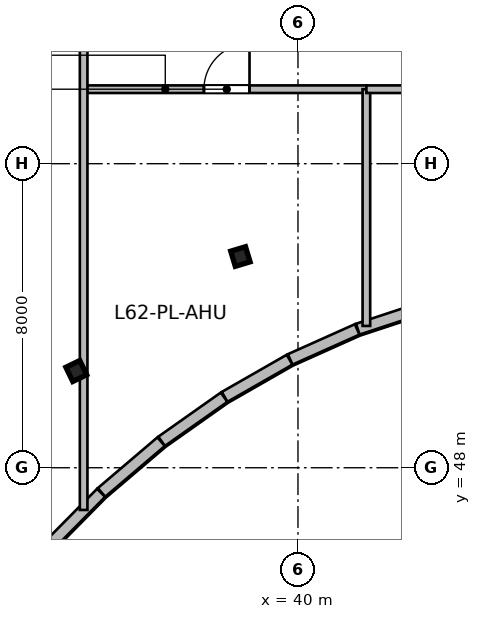
"""IFC4 building model, lengths in metres.
Left out: names, types, materials, properties, quantities, classifications, styles, units other than length and angle.
Written with IfcOpenShell. Run it as: python <this file> out.ifc"""

import sys

from ifc_helpers import new_model, si_unit, direction, frame, frame_2d, origin, origin_2d, place, context, subcontext, project, spatial, rectangle, i_section, extrude, source, transform, mapped, element, fill, save


model = new_model("IFC4")
c1 = context("Model", 3, precision=1e-05, world=origin(), true_north=direction((0.0, 1.0)))
c2 = subcontext(c1, "Body", "Model", "MODEL_VIEW")
j1 = project(units=[si_unit("LENGTHUNIT", "METRE"), si_unit("PLANEANGLEUNIT", "RADIAN")], contexts=[c1])
p1 = place(None, origin())
s1 = spatial("IfcSite", under=j1, at=p1, CompositionType="ELEMENT")
p2 = place(p1, origin())
s2 = spatial("IfcBuilding", under=s1, at=p2, CompositionType="ELEMENT")
p3 = place(p2, frame((0.0, 0.0, 254.7)))
s3 = spatial("IfcBuildingStorey", under=s2, at=p3, CompositionType="ELEMENT", Elevation=254.7)
m1 = source(origin(), c2, "Body", "SweptSolid", [
    extrude(i_section(OverallWidth=0.406, OverallDepth=0.416, WebThickness=0.03, FlangeThickness=0.048, at=origin_2d()), origin(), (0.0, 0.0, 1.0), 5.4),
])
for number, where, z_axis, x_axis in (
    (1, (34.166, 50.545, 0.0), (0.0, 0.0, 1.0), (-0.436, 0.9, 0.0)),
    (2, (38.485, 53.558, 0.0), (0.0, 0.0, 1.0), (-0.289, 0.957, 0.0)),
):
    element("IfcColumn", number, at=place(p3, frame(where, z_axis=z_axis, x_axis=x_axis)), inside=s3, PredefinedType="COLUMN", context=c2, shape_type="MappedRepresentation", body=[
        mapped(m1, transform((0.0, 0.0, 0.0), scale=1.0)),
    ])
m2 = source(origin(), c2, "Body", "SweptSolid", [
    extrude(rectangle(XDim=1.9, YDim=0.3, at=frame_2d((0.95, 0.0))), origin(), (0.0, 0.0, 1.0), 5.15),
])
p4 = place(p3, frame((43.378, 52.241, 0.0), z_axis=(0.0, 0.0, 1.0), x_axis=(-0.949693643068, -0.313180434121, 0.0)))
e3 = element("IfcWall", 3, at=p4, inside=s3, PredefinedType="SOLIDWALL", context=c2, shape_type="MappedRepresentation", body=[
    mapped(m2, transform((0.0, 0.0, 0.0), scale=1.0)),
])
m3 = source(origin(), c2, "Body", "SweptSolid", [
    extrude(rectangle(XDim=1.931, YDim=0.3, at=frame_2d((0.965, 0.0))), origin(), (0.0, 0.0, 1.0), 5.15),
])
p5 = place(p3, frame((41.557, 51.639, 0.0), z_axis=(0.0, 0.0, 1.0), x_axis=(-0.912681759743, -0.408671023481, 0.0)))
e4 = element("IfcWall", 4, at=p5, inside=s3, PredefinedType="SOLIDWALL", context=c2, shape_type="MappedRepresentation", body=[
    mapped(m3, transform((0.0, 0.0, 0.0), scale=1.0)),
])
m4 = source(origin(), c2, "Body", "SweptSolid", [
    extrude(rectangle(XDim=1.969, YDim=0.3, at=frame_2d((0.984, 0.0))), origin(), (0.0, 0.0, 1.0), 5.15),
])
p6 = place(p3, frame((39.779, 50.842, 0.0), z_axis=(0.0, 0.0, 1.0), x_axis=(-0.86797594681, -0.496606238139, 0.0)))
e5 = element("IfcWall", 5, at=p6, inside=s3, PredefinedType="SOLIDWALL", context=c2, shape_type="MappedRepresentation", body=[
    mapped(m4, transform((0.0, 0.0, 0.0), scale=1.0)),
])
m5 = source(origin(), c2, "Body", "SweptSolid", [
    extrude(rectangle(XDim=2.012, YDim=0.3, at=frame_2d((1.006, 0.0))), origin(), (0.0, 0.0, 1.0), 5.15),
])
p7 = place(p3, frame((38.055, 49.855, 0.0), z_axis=(0.0, 0.0, 1.0), x_axis=(-0.817008215805, -0.576626027255, 0.0)))
e6 = element("IfcWall", 6, at=p7, inside=s3, PredefinedType="SOLIDWALL", context=c2, shape_type="MappedRepresentation", body=[
    mapped(m5, transform((0.0, 0.0, 0.0), scale=1.0)),
])
m6 = source(origin(), c2, "Body", "SweptSolid", [
    extrude(rectangle(XDim=2.06, YDim=0.3, at=frame_2d((1.03, 0.0))), origin(), (0.0, 0.0, 1.0), 5.15),
])
p8 = place(p3, frame((36.399, 48.685, 0.0), z_axis=(0.0, 0.0, 1.0), x_axis=(-0.761494573969, -0.648171284319, 0.0)))
e7 = element("IfcWall", 7, at=p8, inside=s3, PredefinedType="SOLIDWALL", context=c2, shape_type="MappedRepresentation", body=[
    mapped(m6, transform((0.0, 0.0, 0.0), scale=1.0)),
])
m7 = source(origin(), c2, "Body", "SweptSolid", [
    extrude(rectangle(XDim=2.11, YDim=0.3, at=frame_2d((1.055, 0.0))), origin(), (0.0, 0.0, 1.0), 5.15),
])
p9 = place(p3, frame((34.819, 47.34, 0.0), z_axis=(0.0, 0.0, 1.0), x_axis=(-0.702695473125, -0.711490739258, 0.0)))
e8 = element("IfcWall", 8, at=p9, inside=s3, PredefinedType="SOLIDWALL", context=c2, shape_type="MappedRepresentation", body=[
    mapped(m7, transform((0.0, 0.0, 0.0), scale=1.0)),
])
m8 = source(origin(), c2, "Body", "SweptSolid", [
    extrude(rectangle(XDim=7.35, YDim=0.2, at=frame_2d((3.675, 0.0))), origin(), (0.0, 0.0, 1.0), 4.824),
])
p10 = place(p3, frame((34.45, 57.96, 0.0), z_axis=(0.0, 0.0, 1.0), x_axis=(1.0, 0.0, 0.0)))
e9 = element("IfcWall", 9, at=p10, inside=s3, PredefinedType="SOLIDWALL", context=c2, shape_type="MappedRepresentation", body=[
    mapped(m8, transform((0.0, 0.0, 0.0), scale=1.0)),
])
p11 = place(p10, frame((3.075, 0.0, 0.0)))
e10 = element("IfcOpeningElement", 10, at=p11, cuts=e9, PredefinedType="OPENING", context=c2, shape_type="SweptSolid", body=[
    extrude(rectangle(XDim=1.2, YDim=2.15, at=frame_2d((0.6, 1.075))), frame((0.0, 0.11, 0.0), z_axis=(0.0, -1.0, 0.0), x_axis=(1.0, 0.0, 0.0)), (0.0, 0.0, 1.0), 0.22),
])
m9 = source(origin(), c2, "Body", "SweptSolid", [
    extrude(rectangle(XDim=6.229, YDim=0.2, at=frame_2d((3.115, 0.0))), origin(), (0.0, 0.0, 1.0), 5.15),
])
p12 = place(p3, frame((41.8, 51.731, 0.0), z_axis=(0.0, 0.0, 1.0), x_axis=(0.0, 1.0, 0.0)))
e11 = element("IfcWall", 11, at=p12, inside=s3, PredefinedType="SOLIDWALL", context=c2, shape_type="MappedRepresentation", body=[
    mapped(m9, transform((0.0, 0.0, 0.0), scale=1.0)),
])
m10 = source(origin(), c2, "Body", "SweptSolid", [
    extrude(rectangle(XDim=7.0, YDim=0.2, at=frame_2d((3.5, 0.0))), origin(), (0.0, 0.0, 1.0), 5.15),
])
p13 = place(p3, frame((41.8, 57.96, 0.0), z_axis=(0.0, 0.0, 1.0), x_axis=(1.0, 0.0, 0.0)))
e12 = element("IfcWall", 12, at=p13, inside=s3, PredefinedType="SOLIDWALL", context=c2, shape_type="MappedRepresentation", body=[
    mapped(m10, transform((0.0, 0.0, 0.0), scale=1.0)),
])
p14 = place(p13, frame((2.9, 0.0, 0.0)))
e13 = element("IfcOpeningElement", 13, at=p14, cuts=e12, PredefinedType="OPENING", context=c2, shape_type="SweptSolid", body=[
    extrude(rectangle(XDim=1.2, YDim=2.15, at=frame_2d((0.6, 1.075))), frame((0.0, 0.11, 0.0), z_axis=(0.0, -1.0, 0.0), x_axis=(1.0, 0.0, 0.0)), (0.0, 0.0, 1.0), 0.22),
])
m11 = source(origin(), c2, "Body", "SweptSolid", [
    extrude(rectangle(XDim=13.511, YDim=0.2, at=frame_2d((6.755, 0.0))), origin(), (0.0, 0.0, 1.0), 5.15),
])
p15 = place(p3, frame((34.36, 46.889, 0.0), z_axis=(0.0, 0.0, 1.0), x_axis=(0.0, 1.0, 0.0)))
e14 = element("IfcWall", 14, at=p15, inside=s3, PredefinedType="SOLIDWALL", context=c2, shape_type="MappedRepresentation", body=[
    mapped(m11, transform((0.0, 0.0, 0.0), scale=1.0)),
])
m12 = source(origin(), c2, "Body", "SweptSolid", [
    extrude(rectangle(XDim=1.2, YDim=2.15, at=frame_2d((0.6, 1.075))), frame((0.0, 0.025, 0.0), z_axis=(0.0, -1.0, 0.0), x_axis=(1.0, 0.0, 0.0)), (0.0, 0.0, 1.0), 0.05),
])
p16 = place(p11, origin())
e15 = element("IfcDoor", 15, at=p16, inside=s3, OperationType="SINGLE_SWING_RIGHT", PredefinedType="DOOR", context=c2, shape_type="MappedRepresentation", body=[
    mapped(m12, transform((0.0, 0.0, 0.0), scale=1.0)),
])
fill(e10, e15)
save(model, sys.argv[1])
